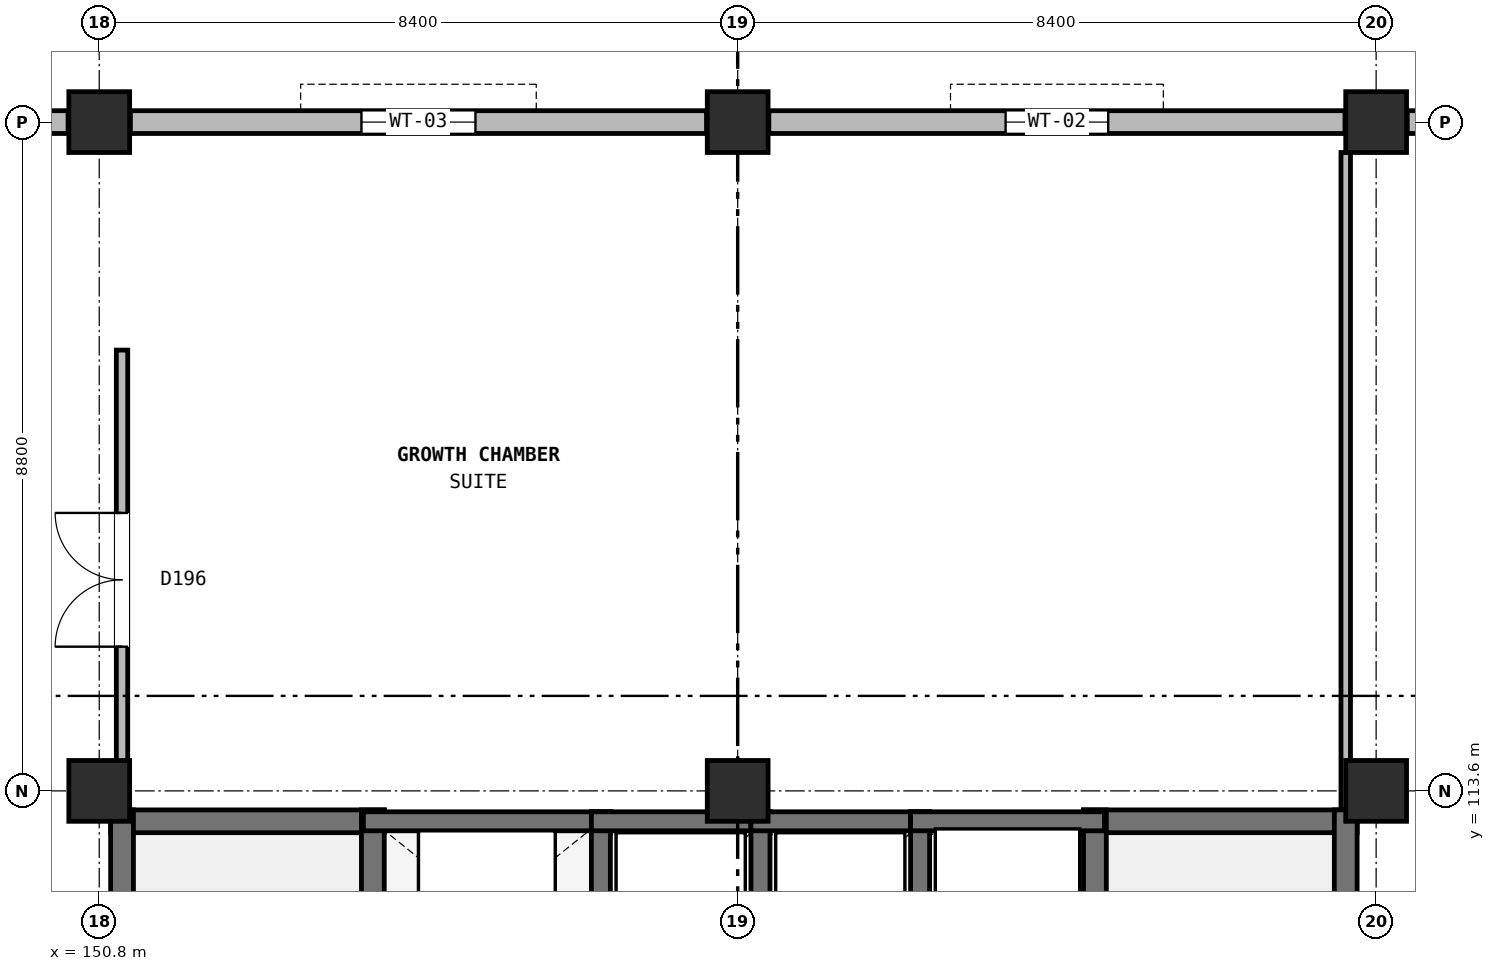
"""IFC4 building model, lengths in metres.
Left out: names, types, materials, properties, quantities, classifications, styles, units other than length and angle.
Written with IfcOpenShell. Run it as: python <this file> out.ifc"""

import sys

from ifc_helpers import new_model, si_unit, direction, frame, frame_2d, origin, origin_2d, place, context, subcontext, project, spatial, rectangle, extrude, element, fill, save


model = new_model("IFC4")
c1 = context("Model", 3, precision=1e-05, world=origin(), true_north=direction((0.0, 1.0)))
c2 = subcontext(c1, "Body", "Model", "MODEL_VIEW")
j1 = project(units=[si_unit("LENGTHUNIT", "METRE"), si_unit("PLANEANGLEUNIT", "RADIAN")], contexts=[c1])
p1 = place(None, origin())
s1 = spatial("IfcSite", under=j1, at=p1, CompositionType="ELEMENT")
p2 = place(p1, origin())
s2 = spatial("IfcBuilding", under=s1, at=p2, CompositionType="ELEMENT")
p3 = place(p2, frame((0.0, 0.0, 13.2)))
s3 = spatial("IfcBuildingStorey", under=s2, at=p3, CompositionType="ELEMENT", Elevation=13.2)
for number, where, z_axis, x_axis in (
    (1, (150.8, 113.6, 0.0), (0.0, 0.0, 1.0), (1.0, 0.0, 0.0)),
    (2, (150.8, 122.4, 0.0), (0.0, 0.0, 1.0), (1.0, 0.0, 0.0)),
    (3, (159.2, 113.6, 0.0), (0.0, 0.0, 1.0), (1.0, 0.0, 0.0)),
    (4, (159.2, 122.4, 0.0), (0.0, 0.0, 1.0), (1.0, 0.0, 0.0)),
    (5, (167.6, 113.6, 0.0), (0.0, 0.0, 1.0), (1.0, 0.0, 0.0)),
    (6, (167.6, 122.4, 0.0), (0.0, 0.0, 1.0), (1.0, 0.0, 0.0)),
):
    element("IfcColumn", number, at=place(p3, frame(where, z_axis=z_axis, x_axis=x_axis)), inside=s3, PredefinedType="COLUMN", context=c2, shape_type="SweptSolid", body=[
        extrude(rectangle(XDim=0.8, YDim=0.8, at=origin_2d()), origin(), (0.0, 0.0, 1.0), 4.0),
    ])
p4 = place(p3, frame((175.59, 122.4, 0.0), z_axis=(0.0, 0.0, 1.0), x_axis=(-1.0, 0.0, 0.0)))
e7 = element("IfcWall", 7, at=p4, inside=s3, PredefinedType="SOLIDWALL", context=c2, shape_type="SweptSolid", body=[
    extrude(rectangle(XDim=7.58, YDim=0.3, at=frame_2d((3.79, 0.0))), origin(), (0.0, 0.0, 1.0), 3.25),
])
p5 = place(p4, frame((1.395, 0.0, 0.9)))
e8 = element("IfcOpeningElement", 8, at=p5, cuts=e7, PredefinedType="OPENING", context=c2, shape_type="SweptSolid", body=[
    extrude(rectangle(XDim=1.2, YDim=1.8, at=frame_2d((0.6, 0.9))), frame((0.0, 0.16, 0.0), z_axis=(0.0, -1.0, 0.0), x_axis=(1.0, 0.0, 0.0)), (0.0, 0.0, 1.0), 0.32),
])
p6 = place(p3, frame((167.19, 122.4, 0.0), z_axis=(0.0, 0.0, 1.0), x_axis=(-1.0, 0.0, 0.0)))
e9 = element("IfcWall", 9, at=p6, inside=s3, PredefinedType="SOLIDWALL", context=c2, shape_type="SweptSolid", body=[
    extrude(rectangle(XDim=7.58, YDim=0.3, at=frame_2d((3.79, 0.0))), origin(), (0.0, 0.0, 1.0), 3.25),
])
p7 = place(p6, frame((3.115, 0.0, 0.9)))
e10 = element("IfcOpeningElement", 10, at=p7, cuts=e9, PredefinedType="OPENING", context=c2, shape_type="SweptSolid", body=[
    extrude(rectangle(XDim=1.35, YDim=1.8, at=frame_2d((0.675, 0.9))), frame((0.0, 0.16, 0.0), z_axis=(0.0, -1.0, 0.0), x_axis=(1.0, 0.0, 0.0)), (0.0, 0.0, 1.0), 0.32),
])
p8 = place(p3, frame((158.79, 122.4, 0.0), z_axis=(0.0, 0.0, 1.0), x_axis=(-1.0, 0.0, 0.0)))
e11 = element("IfcWall", 11, at=p8, inside=s3, PredefinedType="SOLIDWALL", context=c2, shape_type="SweptSolid", body=[
    extrude(rectangle(XDim=7.58, YDim=0.3, at=frame_2d((3.79, 0.0))), origin(), (0.0, 0.0, 1.0), 3.25),
])
p9 = place(p8, frame((3.04, 0.0, 0.9)))
e12 = element("IfcOpeningElement", 12, at=p9, cuts=e11, PredefinedType="OPENING", context=c2, shape_type="SweptSolid", body=[
    extrude(rectangle(XDim=1.5, YDim=1.8, at=frame_2d((0.75, 0.9))), frame((0.0, 0.16, 0.0), z_axis=(0.0, -1.0, 0.0), x_axis=(1.0, 0.0, 0.0)), (0.0, 0.0, 1.0), 0.32),
])
p10 = place(p3, frame((150.39, 122.4, 0.0), z_axis=(0.0, 0.0, 1.0), x_axis=(-1.0, 0.0, 0.0)))
e13 = element("IfcWall", 13, at=p10, inside=s3, PredefinedType="SOLIDWALL", context=c2, shape_type="SweptSolid", body=[
    extrude(rectangle(XDim=7.58, YDim=0.3, at=frame_2d((3.79, 0.0))), origin(), (0.0, 0.0, 1.0), 3.25),
])
p11 = place(p10, frame((2.965, 0.0, 0.9)))
e14 = element("IfcOpeningElement", 14, at=p11, cuts=e13, PredefinedType="OPENING", context=c2, shape_type="SweptSolid", body=[
    extrude(rectangle(XDim=1.65, YDim=1.85, at=frame_2d((0.825, 0.925))), frame((0.0, 0.16, 0.0), z_axis=(0.0, -1.0, 0.0), x_axis=(1.0, 0.0, 0.0)), (0.0, 0.0, 1.0), 0.32),
])
p12 = place(p3, frame((150.95, 113.2, 0.0), z_axis=(0.0, 0.0, 1.0), x_axis=(1.0, 0.0, 0.0)))
e15 = element("IfcWall", 15, at=p12, inside=s3, PredefinedType="SHEAR", context=c2, shape_type="SweptSolid", body=[
    extrude(rectangle(XDim=3.6, YDim=0.3, at=frame_2d((1.8, 0.0))), origin(), (0.0, 0.0, 1.0), 4.0),
])
p13 = place(p3, frame((151.1, 105.05, 0.0), z_axis=(0.0, 0.0, 1.0), x_axis=(0.0, 1.0, 0.0)))
e16 = element("IfcWall", 16, at=p13, inside=s3, PredefinedType="SHEAR", context=c2, shape_type="SweptSolid", body=[
    extrude(rectangle(XDim=8.3, YDim=0.3, at=frame_2d((4.15, 0.0))), origin(), (0.0, 0.0, 1.0), 4.0),
])
p14 = place(p3, frame((154.4, 105.05, 0.0), z_axis=(0.0, 0.0, 1.0), x_axis=(0.0, 1.0, 0.0)))
e17 = element("IfcWall", 17, at=p14, inside=s3, PredefinedType="SHEAR", context=c2, shape_type="SweptSolid", body=[
    extrude(rectangle(XDim=8.3, YDim=0.3, at=frame_2d((4.15, 0.0))), origin(), (0.0, 0.0, 1.0), 4.0),
])
p15 = place(p14, frame((0.45, 0.0, 0.0)))
e18 = element("IfcOpeningElement", 18, at=p15, cuts=e17, PredefinedType="OPENING", context=c2, shape_type="SweptSolid", body=[
    extrude(rectangle(XDim=1.1, YDim=2.2, at=frame_2d((0.55, 1.1))), frame((0.0, 0.16, 0.0), z_axis=(0.0, -1.0, 0.0), x_axis=(1.0, 0.0, 0.0)), (0.0, 0.0, 1.0), 0.32),
])
p16 = place(p3, frame((163.75, 113.2, 0.0), z_axis=(0.0, 0.0, 1.0), x_axis=(1.0, 0.0, 0.0)))
e19 = element("IfcWall", 19, at=p16, inside=s3, PredefinedType="SHEAR", context=c2, shape_type="SweptSolid", body=[
    extrude(rectangle(XDim=3.6, YDim=0.3, at=frame_2d((1.8, 0.0))), origin(), (0.0, 0.0, 1.0), 4.0),
])
for number, where, z_axis, x_axis in (
    (20, (163.9, 105.05, 0.0), (0.0, 0.0, 1.0), (0.0, 1.0, 0.0)),
    (21, (167.2, 105.05, 0.0), (0.0, 0.0, 1.0), (0.0, 1.0, 0.0)),
):
    element("IfcWall", number, at=place(p3, frame(where, z_axis=z_axis, x_axis=x_axis)), inside=s3, PredefinedType="SHEAR", context=c2, shape_type="SweptSolid", body=[
        extrude(rectangle(XDim=8.3, YDim=0.3, at=frame_2d((4.15, 0.0))), origin(), (0.0, 0.0, 1.0), 4.0),
    ])
p17 = place(p3, frame((154.275, 113.2, 0.0), z_axis=(0.0, 0.0, 1.0), x_axis=(1.0, 0.0, 0.0)))
e22 = element("IfcWall", 22, at=p17, inside=s3, PredefinedType="SOLIDWALL", context=c2, shape_type="SweptSolid", body=[
    extrude(rectangle(XDim=3.25, YDim=0.25, at=frame_2d((1.625, 0.0))), origin(), (0.0, 0.0, 1.0), 3.68),
])
p18 = place(p3, frame((157.4, 110.675, 0.0), z_axis=(0.0, 0.0, 1.0), x_axis=(0.0, 1.0, 0.0)))
e23 = element("IfcWall", 23, at=p18, inside=s3, PredefinedType="SOLIDWALL", context=c2, shape_type="SweptSolid", body=[
    extrude(rectangle(XDim=2.65, YDim=0.25, at=frame_2d((1.325, 0.0))), origin(), (0.0, 0.0, 1.0), 3.68),
])
p19 = place(p3, frame((157.275, 113.2, 0.0), z_axis=(0.0, 0.0, 1.0), x_axis=(1.0, 0.0, 0.0)))
e24 = element("IfcWall", 24, at=p19, inside=s3, PredefinedType="SOLIDWALL", context=c2, shape_type="SweptSolid", body=[
    extrude(rectangle(XDim=2.35, YDim=0.25, at=frame_2d((1.175, 0.0))), origin(), (0.0, 0.0, 1.0), 3.68),
])
p20 = place(p3, frame((159.5, 110.675, 0.0), z_axis=(0.0, 0.0, 1.0), x_axis=(0.0, 1.0, 0.0)))
e25 = element("IfcWall", 25, at=p20, inside=s3, PredefinedType="SOLIDWALL", context=c2, shape_type="SweptSolid", body=[
    extrude(rectangle(XDim=2.65, YDim=0.25, at=frame_2d((1.325, 0.0))), origin(), (0.0, 0.0, 1.0), 3.68),
])
p21 = place(p3, frame((159.375, 113.2, 0.0), z_axis=(0.0, 0.0, 1.0), x_axis=(1.0, 0.0, 0.0)))
e26 = element("IfcWall", 26, at=p21, inside=s3, PredefinedType="SOLIDWALL", context=c2, shape_type="SweptSolid", body=[
    extrude(rectangle(XDim=2.35, YDim=0.25, at=frame_2d((1.175, 0.0))), origin(), (0.0, 0.0, 1.0), 3.68),
])
p22 = place(p3, frame((161.6, 110.675, 0.0), z_axis=(0.0, 0.0, 1.0), x_axis=(0.0, 1.0, 0.0)))
e27 = element("IfcWall", 27, at=p22, inside=s3, PredefinedType="SOLIDWALL", context=c2, shape_type="SweptSolid", body=[
    extrude(rectangle(XDim=2.65, YDim=0.25, at=frame_2d((1.325, 0.0))), origin(), (0.0, 0.0, 1.0), 3.68),
])
p23 = place(p3, frame((161.475, 113.2, 0.0), z_axis=(0.0, 0.0, 1.0), x_axis=(1.0, 0.0, 0.0)))
e28 = element("IfcWall", 28, at=p23, inside=s3, PredefinedType="SOLIDWALL", context=c2, shape_type="SweptSolid", body=[
    extrude(rectangle(XDim=2.55, YDim=0.25, at=frame_2d((1.275, 0.0))), origin(), (0.0, 0.0, 1.0), 3.68),
])
p24 = place(p3, frame((151.1, 113.355, 0.0), z_axis=(0.0, 0.0, 1.0), x_axis=(0.0, 1.0, 0.0)))
e29 = element("IfcWall", 29, at=p24, inside=s3, PredefinedType="PARTITIONING", context=c2, shape_type="SweptSolid", body=[
    extrude(rectangle(XDim=6.045, YDim=0.15, at=frame_2d((3.022, 0.0))), origin(), (0.0, 0.0, 1.0), 3.245),
])
p25 = place(p24, frame((2.143, 0.0, 0.0)))
e30 = element("IfcOpeningElement", 30, at=p25, cuts=e29, PredefinedType="OPENING", context=c2, shape_type="SweptSolid", body=[
    extrude(rectangle(XDim=1.76, YDim=2.36, at=frame_2d((0.88, 1.18))), frame((0.0, 0.085, 0.0), z_axis=(0.0, -1.0, 0.0), x_axis=(1.0, 0.0, 0.0)), (0.0, 0.0, 1.0), 0.17),
])
p26 = place(p3, frame((167.2, 113.355, 0.0), z_axis=(0.0, 0.0, 1.0), x_axis=(0.0, 1.0, 0.0)))
e31 = element("IfcWall", 31, at=p26, inside=s3, PredefinedType="PARTITIONING", context=c2, shape_type="SweptSolid", body=[
    extrude(rectangle(XDim=8.645, YDim=0.125, at=frame_2d((4.323, 0.0))), origin(), (0.0, 0.0, 1.0), 3.245),
])
p27 = place(p7, origin())
e32 = element("IfcWindow", 32, at=p27, inside=s3, PartitioningType="SINGLE_PANEL", PredefinedType="WINDOW", context=c2, shape_type="SweptSolid", body=[
    extrude(rectangle(XDim=1.35, YDim=1.8, at=frame_2d((0.675, 0.9))), frame((0.0, 0.03, 0.0), z_axis=(0.0, -1.0, 0.0), x_axis=(1.0, 0.0, 0.0)), (0.0, 0.0, 1.0), 0.06),
])
fill(e10, e32)
p28 = place(p9, origin())
e33 = element("IfcWindow", 33, at=p28, inside=s3, PartitioningType="SINGLE_PANEL", PredefinedType="WINDOW", context=c2, shape_type="SweptSolid", body=[
    extrude(rectangle(XDim=1.5, YDim=1.8, at=frame_2d((0.75, 0.9))), frame((0.0, 0.03, 0.0), z_axis=(0.0, -1.0, 0.0), x_axis=(1.0, 0.0, 0.0)), (0.0, 0.0, 1.0), 0.06),
])
fill(e12, e33)
p29 = place(p25, origin())
e34 = element("IfcDoor", 34, at=p29, inside=s3, OperationType="DOUBLE_DOOR_SINGLE_SWING", PredefinedType="DOOR", context=c2, shape_type="SweptSolid", body=[
    extrude(rectangle(XDim=1.76, YDim=2.36, at=frame_2d((0.88, 1.18))), frame((0.0, 0.025, 0.0), z_axis=(0.0, -1.0, 0.0), x_axis=(1.0, 0.0, 0.0)), (0.0, 0.0, 1.0), 0.05),
])
fill(e30, e34)
save(model, sys.argv[1])
